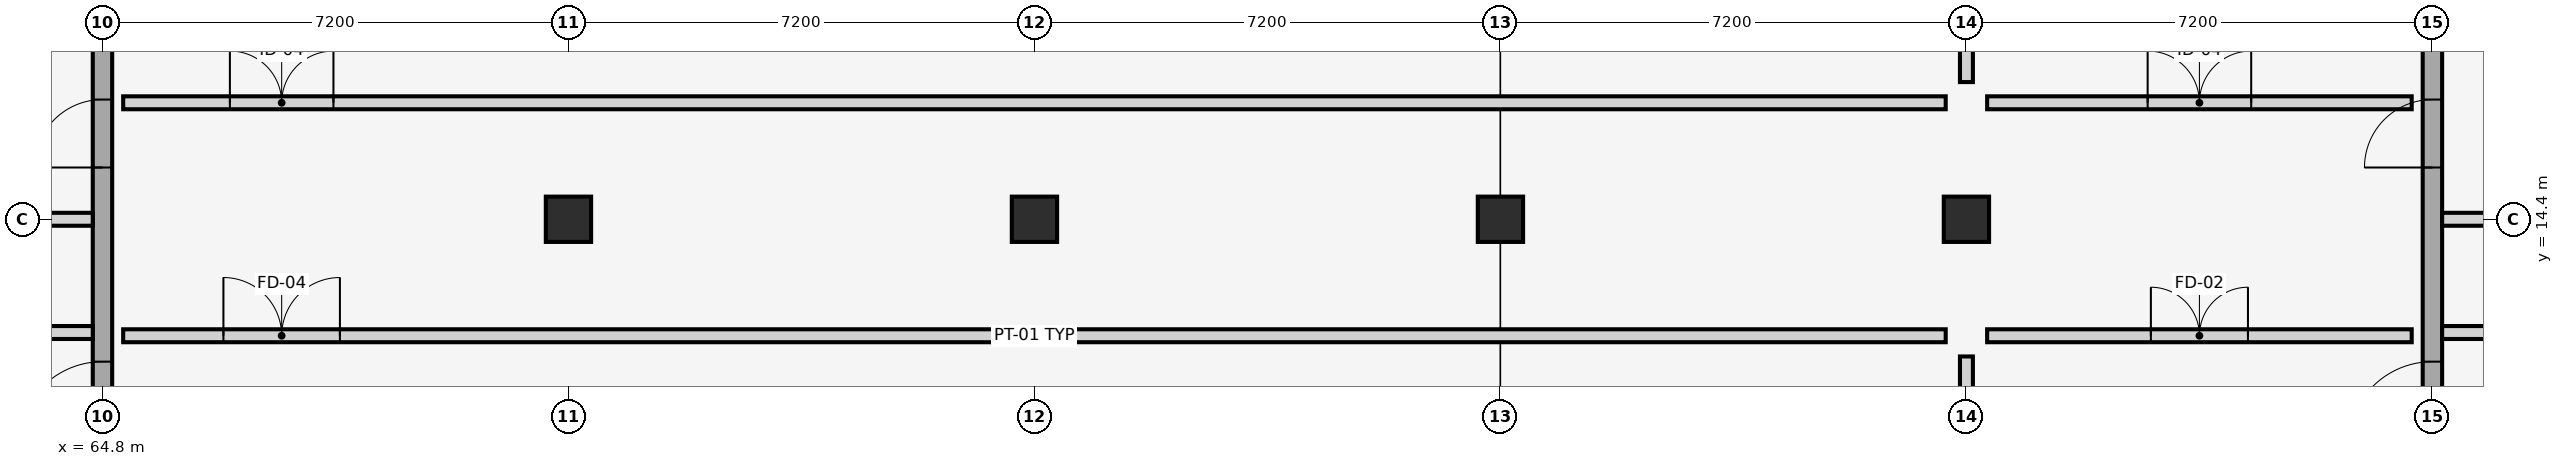
"""IFC4 building model, lengths in metres.
Left out: names, types, materials, properties, quantities, classifications, styles, units other than length and angle.
Written with IfcOpenShell. Run it as: python <this file> out.ifc"""

import sys

from ifc_helpers import new_model, si_unit, direction, frame, frame_2d, origin, origin_2d, place, context, subcontext, project, spatial, rectangle, extrude, element, fill, save


model = new_model("IFC4")
c1 = context("Model", 3, precision=1e-05, world=origin(), true_north=direction((0.0, 1.0)))
c2 = subcontext(c1, "Body", "Model", "MODEL_VIEW")
j1 = project(units=[si_unit("LENGTHUNIT", "METRE"), si_unit("PLANEANGLEUNIT", "RADIAN")], contexts=[c1])
p1 = place(None, origin())
s1 = spatial("IfcSite", under=j1, at=p1, CompositionType="ELEMENT")
p2 = place(p1, origin())
s2 = spatial("IfcBuilding", under=s1, at=p2, CompositionType="ELEMENT")
p3 = place(p2, frame((0.0, 0.0, -4.5)))
s3 = spatial("IfcBuildingStorey", under=s2, at=p3, CompositionType="ELEMENT", Elevation=-4.5)
for number, where, z_axis, x_axis in (
    (1, (72.0, 14.4, -0.45), (0.0, 0.0, 1.0), (1.0, 0.0, 0.0)),
    (2, (79.2, 14.4, -0.45), (0.0, 0.0, 1.0), (0.0, 1.0, 0.0)),
    (3, (86.4, 14.4, -0.45), (0.0, 0.0, 1.0), (1.0, 0.0, 0.0)),
    (4, (93.6, 14.4, -0.45), (0.0, 0.0, 1.0), (0.0, 1.0, 0.0)),
):
    element("IfcColumn", number, at=place(p3, frame(where, z_axis=z_axis, x_axis=x_axis)), inside=s3, PredefinedType="COLUMN", context=c2, shape_type="SweptSolid", body=[
        extrude(rectangle(XDim=0.7, YDim=0.7, at=origin_2d()), origin(), (0.0, 0.0, 1.0), 4.95),
    ])
p4 = place(p3, frame((64.8, 7.35, 0.0), z_axis=(0.0, 0.0, 1.0), x_axis=(0.0, 1.0, 0.0)))
e5 = element("IfcWall", 5, at=p4, inside=s3, PredefinedType="SHEAR", context=c2, shape_type="SweptSolid", body=[
    extrude(rectangle(XDim=14.1, YDim=0.3, at=frame_2d((7.05, 0.0))), origin(), (0.0, 0.0, 1.0), 4.25),
])
p5 = place(p4, frame((3.55, 0.0, 0.0)))
e6 = element("IfcOpeningElement", 6, at=p5, cuts=e5, PredefinedType="OPENING", context=c2, shape_type="SweptSolid", body=[
    extrude(rectangle(XDim=1.3, YDim=2.2, at=frame_2d((0.65, 1.1))), frame((0.0, 0.16, 0.0), z_axis=(0.0, -1.0, 0.0), x_axis=(1.0, 0.0, 0.0)), (0.0, 0.0, 1.0), 0.32),
])
p6 = place(p4, frame((7.85, 0.0, 0.0)))
e7 = element("IfcOpeningElement", 7, at=p6, cuts=e5, PredefinedType="OPENING", context=c2, shape_type="SweptSolid", body=[
    extrude(rectangle(XDim=1.05, YDim=2.15, at=frame_2d((0.525, 1.075))), frame((0.0, 0.16, 0.0), z_axis=(0.0, -1.0, 0.0), x_axis=(1.0, 0.0, 0.0)), (0.0, 0.0, 1.0), 0.32),
])
p7 = place(p4, frame((10.55, 0.0, 0.0)))
e8 = element("IfcOpeningElement", 8, at=p7, cuts=e5, PredefinedType="OPENING", context=c2, shape_type="SweptSolid", body=[
    extrude(rectangle(XDim=1.0, YDim=2.15, at=frame_2d((0.5, 1.075))), frame((0.0, 0.16, 0.0), z_axis=(0.0, -1.0, 0.0), x_axis=(1.0, 0.0, 0.0)), (0.0, 0.0, 1.0), 0.32),
])
p8 = place(p3, frame((61.1, 12.65, 0.0), z_axis=(0.0, 0.0, 1.0), x_axis=(1.0, 0.0, 0.0)))
e9 = element("IfcWall", 9, at=p8, inside=s3, PredefinedType="PLUMBINGWALL", context=c2, shape_type="SweptSolid", body=[
    extrude(rectangle(XDim=3.55, YDim=0.2, at=frame_2d((1.775, 0.0))), origin(), (0.0, 0.0, 1.0), 3.67),
])
p9 = place(p8, frame((0.9, 0.0, 0.0)))
e10 = element("IfcOpeningElement", 10, at=p9, cuts=e9, PredefinedType="OPENING", context=c2, shape_type="SweptSolid", body=[
    extrude(rectangle(XDim=0.85, YDim=2.05, at=frame_2d((0.425, 1.025))), frame((0.0, 0.11, 0.0), z_axis=(0.0, -1.0, 0.0), x_axis=(1.0, 0.0, 0.0)), (0.0, 0.0, 1.0), 0.22),
])
p10 = place(p3, frame((61.1, 14.4, 0.0), z_axis=(0.0, 0.0, 1.0), x_axis=(1.0, 0.0, 0.0)))
e11 = element("IfcWall", 11, at=p10, inside=s3, PredefinedType="PLUMBINGWALL", context=c2, shape_type="SweptSolid", body=[
    extrude(rectangle(XDim=3.55, YDim=0.2, at=frame_2d((1.775, 0.0))), origin(), (0.0, 0.0, 1.0), 3.67),
])
p11 = place(p3, frame((100.8, 7.35, 0.0), z_axis=(0.0, 0.0, 1.0), x_axis=(0.0, 1.0, 0.0)))
e12 = element("IfcWall", 12, at=p11, inside=s3, PredefinedType="SHEAR", context=c2, shape_type="SweptSolid", body=[
    extrude(rectangle(XDim=14.1, YDim=0.3, at=frame_2d((7.05, 0.0))), origin(), (0.0, 0.0, 1.0), 4.25),
])
p12 = place(p11, frame((3.55, 0.0, 0.0)))
e13 = element("IfcOpeningElement", 13, at=p12, cuts=e12, PredefinedType="OPENING", context=c2, shape_type="SweptSolid", body=[
    extrude(rectangle(XDim=1.3, YDim=2.2, at=frame_2d((0.65, 1.1))), frame((0.0, 0.16, 0.0), z_axis=(0.0, -1.0, 0.0), x_axis=(1.0, 0.0, 0.0)), (0.0, 0.0, 1.0), 0.32),
])
p13 = place(p11, frame((7.85, 0.0, 0.0)))
e14 = element("IfcOpeningElement", 14, at=p13, cuts=e12, PredefinedType="OPENING", context=c2, shape_type="SweptSolid", body=[
    extrude(rectangle(XDim=1.05, YDim=2.15, at=frame_2d((0.525, 1.075))), frame((0.0, 0.16, 0.0), z_axis=(0.0, -1.0, 0.0), x_axis=(1.0, 0.0, 0.0)), (0.0, 0.0, 1.0), 0.32),
])
p14 = place(p11, frame((10.55, 0.0, 0.0)))
e15 = element("IfcOpeningElement", 15, at=p14, cuts=e12, PredefinedType="OPENING", context=c2, shape_type="SweptSolid", body=[
    extrude(rectangle(XDim=1.0, YDim=2.15, at=frame_2d((0.5, 1.075))), frame((0.0, 0.16, 0.0), z_axis=(0.0, -1.0, 0.0), x_axis=(1.0, 0.0, 0.0)), (0.0, 0.0, 1.0), 0.32),
])
p15 = place(p3, frame((100.95, 12.65, 0.0), z_axis=(0.0, 0.0, 1.0), x_axis=(1.0, 0.0, 0.0)))
e16 = element("IfcWall", 16, at=p15, inside=s3, PredefinedType="PLUMBINGWALL", context=c2, shape_type="SweptSolid", body=[
    extrude(rectangle(XDim=3.55, YDim=0.2, at=frame_2d((1.775, 0.0))), origin(), (0.0, 0.0, 1.0), 3.67),
])
p16 = place(p15, frame((0.9, 0.0, 0.0)))
e17 = element("IfcOpeningElement", 17, at=p16, cuts=e16, PredefinedType="OPENING", context=c2, shape_type="SweptSolid", body=[
    extrude(rectangle(XDim=0.85, YDim=2.05, at=frame_2d((0.425, 1.025))), frame((0.0, 0.11, 0.0), z_axis=(0.0, -1.0, 0.0), x_axis=(1.0, 0.0, 0.0)), (0.0, 0.0, 1.0), 0.22),
])
p17 = place(p3, frame((100.95, 14.4, 0.0), z_axis=(0.0, 0.0, 1.0), x_axis=(1.0, 0.0, 0.0)))
e18 = element("IfcWall", 18, at=p17, inside=s3, PredefinedType="PLUMBINGWALL", context=c2, shape_type="SweptSolid", body=[
    extrude(rectangle(XDim=3.55, YDim=0.2, at=frame_2d((1.775, 0.0))), origin(), (0.0, 0.0, 1.0), 3.67),
])
p18 = place(p3, frame((65.12, 12.6, 0.0), z_axis=(0.0, 0.0, 1.0), x_axis=(1.0, 0.0, 0.0)))
e19 = element("IfcWall", 19, at=p18, inside=s3, PredefinedType="PARTITIONING", context=c2, shape_type="SweptSolid", body=[
    extrude(rectangle(XDim=28.16, YDim=0.2, at=frame_2d((14.08, 0.0))), origin(), (0.0, 0.0, 1.0), 3.45),
])
p19 = place(p18, frame((1.549, 0.0, 0.0)))
e20 = element("IfcOpeningElement", 20, at=p19, cuts=e19, PredefinedType="OPENING", context=c2, shape_type="SweptSolid", body=[
    extrude(rectangle(XDim=1.8, YDim=2.4, at=frame_2d((0.9, 1.2))), frame((0.0, 0.11, 0.0), z_axis=(0.0, -1.0, 0.0), x_axis=(1.0, 0.0, 0.0)), (0.0, 0.0, 1.0), 0.22),
])
p20 = place(p3, frame((93.92, 12.6, 0.0), z_axis=(0.0, 0.0, 1.0), x_axis=(1.0, 0.0, 0.0)))
e21 = element("IfcWall", 21, at=p20, inside=s3, PredefinedType="PARTITIONING", context=c2, shape_type="SweptSolid", body=[
    extrude(rectangle(XDim=6.56, YDim=0.2, at=frame_2d((3.28, 0.0))), origin(), (0.0, 0.0, 1.0), 3.45),
])
p21 = place(p20, frame((2.53, 0.0, 0.0)))
e22 = element("IfcOpeningElement", 22, at=p21, cuts=e21, PredefinedType="OPENING", context=c2, shape_type="SweptSolid", body=[
    extrude(rectangle(XDim=1.5, YDim=2.25, at=frame_2d((0.75, 1.125))), frame((0.0, 0.11, 0.0), z_axis=(0.0, -1.0, 0.0), x_axis=(1.0, 0.0, 0.0)), (0.0, 0.0, 1.0), 0.22),
])
p22 = place(p3, frame((65.12, 16.2, 0.0), z_axis=(0.0, 0.0, 1.0), x_axis=(1.0, 0.0, 0.0)))
e23 = element("IfcWall", 23, at=p22, inside=s3, PredefinedType="PARTITIONING", context=c2, shape_type="SweptSolid", body=[
    extrude(rectangle(XDim=28.16, YDim=0.2, at=frame_2d((14.08, 0.0))), origin(), (0.0, 0.0, 1.0), 3.45),
])
p23 = place(p22, frame((1.649, 0.0, 0.0)))
e24 = element("IfcOpeningElement", 24, at=p23, cuts=e23, PredefinedType="OPENING", context=c2, shape_type="SweptSolid", body=[
    extrude(rectangle(XDim=1.6, YDim=2.35, at=frame_2d((0.8, 1.175))), frame((0.0, 0.11, 0.0), z_axis=(0.0, -1.0, 0.0), x_axis=(1.0, 0.0, 0.0)), (0.0, 0.0, 1.0), 0.22),
])
p24 = place(p3, frame((93.92, 16.2, 0.0), z_axis=(0.0, 0.0, 1.0), x_axis=(1.0, 0.0, 0.0)))
e25 = element("IfcWall", 25, at=p24, inside=s3, PredefinedType="PARTITIONING", context=c2, shape_type="SweptSolid", body=[
    extrude(rectangle(XDim=6.56, YDim=0.2, at=frame_2d((3.28, 0.0))), origin(), (0.0, 0.0, 1.0), 3.45),
])
p25 = place(p24, frame((2.48, 0.0, 0.0)))
e26 = element("IfcOpeningElement", 26, at=p25, cuts=e25, PredefinedType="OPENING", context=c2, shape_type="SweptSolid", body=[
    extrude(rectangle(XDim=1.6, YDim=2.35, at=frame_2d((0.8, 1.175))), frame((0.0, 0.11, 0.0), z_axis=(0.0, -1.0, 0.0), x_axis=(1.0, 0.0, 0.0)), (0.0, 0.0, 1.0), 0.22),
])
p26 = place(p3, frame((93.6, 0.32, 0.0), z_axis=(0.0, 0.0, 1.0), x_axis=(0.0, 1.0, 0.0)))
e27 = element("IfcWall", 27, at=p26, inside=s3, PredefinedType="PARTITIONING", context=c2, shape_type="SweptSolid", body=[
    extrude(rectangle(XDim=11.96, YDim=0.2, at=frame_2d((5.98, 0.0))), origin(), (0.0, 0.0, 1.0), 3.45),
])
p27 = place(p26, frame((1.758, 0.0, 0.0)))
e28 = element("IfcOpeningElement", 28, at=p27, cuts=e27, PredefinedType="OPENING", context=c2, shape_type="SweptSolid", body=[
    extrude(rectangle(XDim=1.8, YDim=2.4, at=frame_2d((0.9, 1.2))), frame((0.0, 0.11, 0.0), z_axis=(0.0, -1.0, 0.0), x_axis=(1.0, 0.0, 0.0)), (0.0, 0.0, 1.0), 0.22),
])
p28 = place(p3, frame((93.6, 16.52, 0.0), z_axis=(0.0, 0.0, 1.0), x_axis=(0.0, 1.0, 0.0)))
e29 = element("IfcWall", 29, at=p28, inside=s3, PredefinedType="PARTITIONING", context=c2, shape_type="SweptSolid", body=[
    extrude(rectangle(XDim=11.96, YDim=0.2, at=frame_2d((5.98, 0.0))), origin(), (0.0, 0.0, 1.0), 3.45),
])
p29 = place(p28, frame((0.579, 0.0, 0.0)))
e30 = element("IfcOpeningElement", 30, at=p29, cuts=e29, PredefinedType="OPENING", context=c2, shape_type="SweptSolid", body=[
    extrude(rectangle(XDim=1.5, YDim=2.25, at=frame_2d((0.75, 1.125))), frame((0.0, 0.11, 0.0), z_axis=(0.0, -1.0, 0.0), x_axis=(1.0, 0.0, 0.0)), (0.0, 0.0, 1.0), 0.22),
])
p30 = place(p5, origin())
e31 = element("IfcDoor", 31, at=p30, inside=s3, OperationType="SINGLE_SWING_LEFT", PredefinedType="DOOR", context=c2, shape_type="SweptSolid", body=[
    extrude(rectangle(XDim=1.3, YDim=2.2, at=frame_2d((0.65, 1.1))), frame((0.0, 0.025, 0.0), z_axis=(0.0, -1.0, 0.0), x_axis=(1.0, 0.0, 0.0)), (0.0, 0.0, 1.0), 0.05),
])
fill(e6, e31)
p31 = place(p6, origin())
e32 = element("IfcDoor", 32, at=p31, inside=s3, OperationType="SINGLE_SWING_LEFT", PredefinedType="DOOR", context=c2, shape_type="SweptSolid", body=[
    extrude(rectangle(XDim=1.05, YDim=2.15, at=frame_2d((0.525, 1.075))), frame((0.0, 0.025, 0.0), z_axis=(0.0, -1.0, 0.0), x_axis=(1.0, 0.0, 0.0)), (0.0, 0.0, 1.0), 0.05),
])
fill(e7, e32)
p32 = place(p12, origin())
e33 = element("IfcDoor", 33, at=p32, inside=s3, OperationType="SINGLE_SWING_LEFT", PredefinedType="DOOR", context=c2, shape_type="SweptSolid", body=[
    extrude(rectangle(XDim=1.3, YDim=2.2, at=frame_2d((0.65, 1.1))), frame((0.0, 0.025, 0.0), z_axis=(0.0, -1.0, 0.0), x_axis=(1.0, 0.0, 0.0)), (0.0, 0.0, 1.0), 0.05),
])
fill(e13, e33)
p33 = place(p13, origin())
e34 = element("IfcDoor", 34, at=p33, inside=s3, OperationType="SINGLE_SWING_LEFT", PredefinedType="DOOR", context=c2, shape_type="SweptSolid", body=[
    extrude(rectangle(XDim=1.05, YDim=2.15, at=frame_2d((0.525, 1.075))), frame((0.0, 0.025, 0.0), z_axis=(0.0, -1.0, 0.0), x_axis=(1.0, 0.0, 0.0)), (0.0, 0.0, 1.0), 0.05),
])
fill(e14, e34)
p34 = place(p19, origin())
e35 = element("IfcDoor", 35, at=p34, inside=s3, OperationType="DOUBLE_DOOR_SINGLE_SWING", PredefinedType="DOOR", context=c2, shape_type="SweptSolid", body=[
    extrude(rectangle(XDim=1.8, YDim=2.4, at=frame_2d((0.9, 1.2))), frame((0.0, 0.025, 0.0), z_axis=(0.0, -1.0, 0.0), x_axis=(1.0, 0.0, 0.0)), (0.0, 0.0, 1.0), 0.05),
])
fill(e20, e35)
p35 = place(p21, origin())
e36 = element("IfcDoor", 36, at=p35, inside=s3, OperationType="DOUBLE_DOOR_SINGLE_SWING", PredefinedType="DOOR", context=c2, shape_type="SweptSolid", body=[
    extrude(rectangle(XDim=1.5, YDim=2.25, at=frame_2d((0.75, 1.125))), frame((0.0, 0.025, 0.0), z_axis=(0.0, -1.0, 0.0), x_axis=(1.0, 0.0, 0.0)), (0.0, 0.0, 1.0), 0.05),
])
fill(e22, e36)
p36 = place(p23, origin())
e37 = element("IfcDoor", 37, at=p36, inside=s3, OperationType="DOUBLE_DOOR_SINGLE_SWING", PredefinedType="DOOR", context=c2, shape_type="SweptSolid", body=[
    extrude(rectangle(XDim=1.6, YDim=2.35, at=frame_2d((0.8, 1.175))), frame((0.0, 0.025, 0.0), z_axis=(0.0, -1.0, 0.0), x_axis=(1.0, 0.0, 0.0)), (0.0, 0.0, 1.0), 0.05),
])
fill(e24, e37)
p37 = place(p25, origin())
e38 = element("IfcDoor", 38, at=p37, inside=s3, OperationType="DOUBLE_DOOR_SINGLE_SWING", PredefinedType="DOOR", context=c2, shape_type="SweptSolid", body=[
    extrude(rectangle(XDim=1.6, YDim=2.35, at=frame_2d((0.8, 1.175))), frame((0.0, 0.025, 0.0), z_axis=(0.0, -1.0, 0.0), x_axis=(1.0, 0.0, 0.0)), (0.0, 0.0, 1.0), 0.05),
])
fill(e26, e38)
save(model, sys.argv[1])
